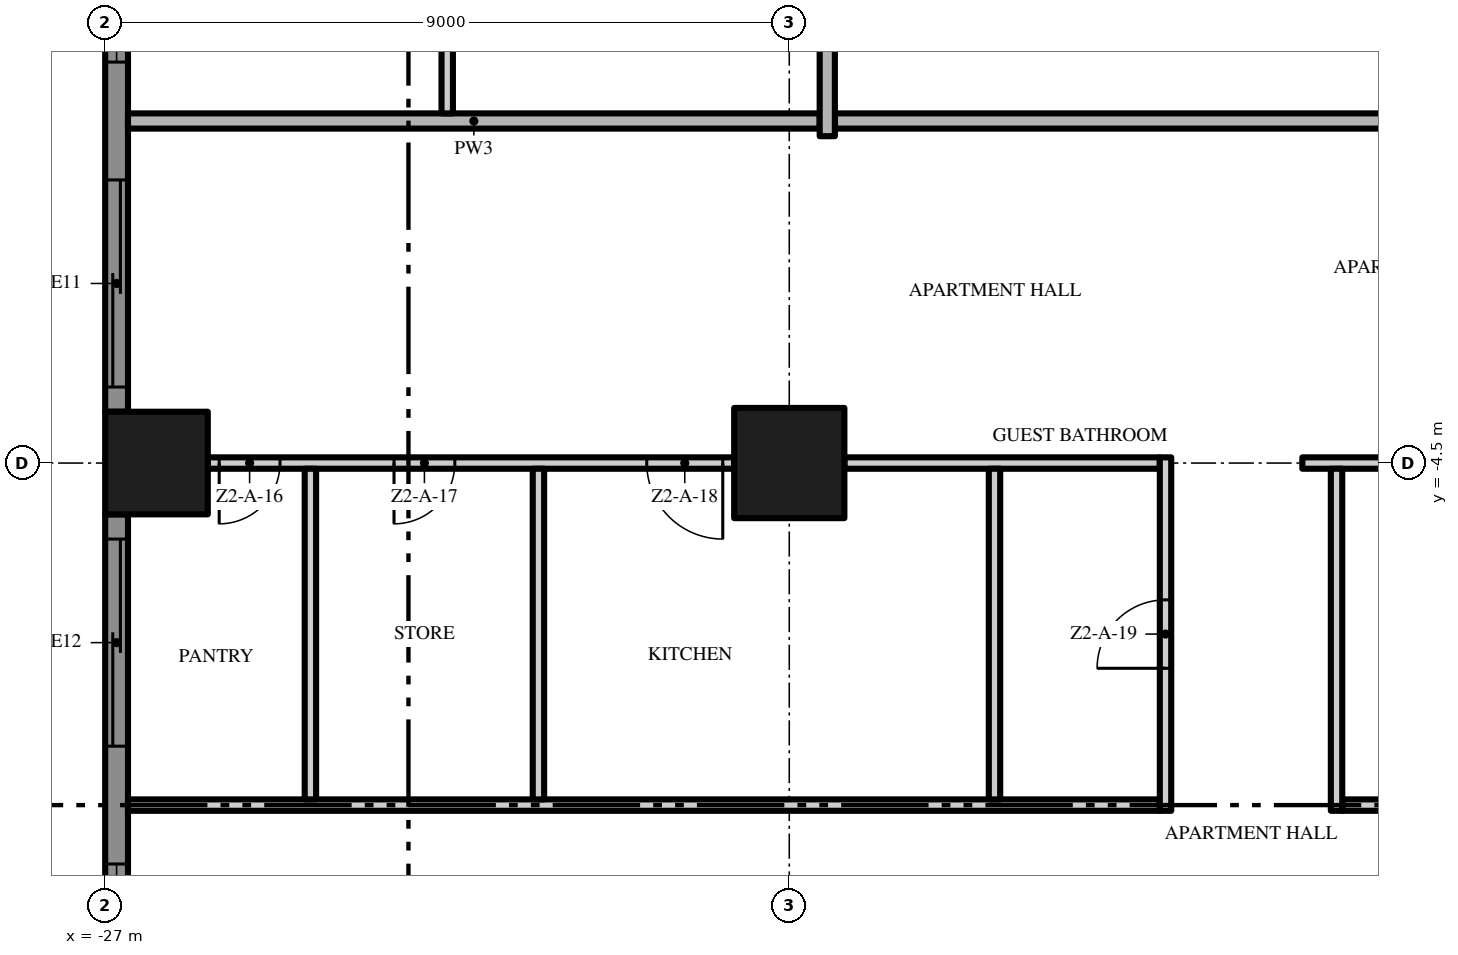
"""IFC4 building model, lengths in metres.
Left out: names, types, materials, properties, quantities, classifications, styles, units other than length and angle.
Written with IfcOpenShell. Run it as: python <this file> out.ifc"""

import sys

from ifc_helpers import new_model, si_unit, direction, frame, frame_2d, origin, origin_2d, place, context, subcontext, project, spatial, polyline, rectangle, outline, extrude, element, fill, save


model = new_model("IFC4")
c1 = context("Model", 3, precision=1e-05, world=origin(), true_north=direction((0.0, 1.0)))
c2 = subcontext(c1, "Body", "Model", "MODEL_VIEW")
j1 = project(units=[si_unit("LENGTHUNIT", "METRE"), si_unit("PLANEANGLEUNIT", "RADIAN")], contexts=[c1])
p1 = place(None, origin())
s1 = spatial("IfcSite", under=j1, at=p1, CompositionType="ELEMENT")
p2 = place(p1, origin())
s2 = spatial("IfcBuilding", under=s1, at=p2, CompositionType="ELEMENT")
p3 = place(p2, frame((0.0, 0.0, 69.4)))
s3 = spatial("IfcBuildingStorey", under=s2, at=p3, CompositionType="ELEMENT", Elevation=69.4)
p4 = place(p3, frame((-18.0, -4.5, 0.0), z_axis=(0.0, 0.0, 1.0), x_axis=(1.0, 0.0, 0.0)))
e1 = element("IfcColumn", 1, at=p4, inside=s3, PredefinedType="COLUMN", context=c2, shape_type="SweptSolid", body=[
    extrude(rectangle(XDim=1.45, YDim=1.45, at=origin_2d()), origin(), (0.0, 0.0, 1.0), 3.5),
])
p5 = place(p3, frame((-26.325, -4.5, 0.0), z_axis=(0.0, 0.0, 1.0), x_axis=(1.0, 0.0, 0.0)))
e2 = element("IfcColumn", 2, at=p5, inside=s3, PredefinedType="COLUMN", context=c2, shape_type="SweptSolid", body=[
    extrude(rectangle(XDim=1.35, YDim=1.35, at=origin_2d()), origin(), (0.0, 0.0, 1.0), 3.5),
])
p6 = place(p3, frame((-26.85, -3.825, 0.0), z_axis=(0.0, 0.0, 1.0), x_axis=(0.0, 1.0, 0.0)))
e3 = element("IfcWall", 3, at=p6, inside=s3, PredefinedType="SOLIDWALL", context=c2, shape_type="SweptSolid", body=[
    extrude(rectangle(XDim=7.65, YDim=0.3, at=frame_2d((3.825, 0.0))), origin(), (0.0, 0.0, 1.0), 3.5),
])
p7 = place(p6, frame((4.6, 0.0, 0.45)))
e4 = element("IfcOpeningElement", 4, at=p7, cuts=e3, PredefinedType="OPENING", context=c2, shape_type="SweptSolid", body=[
    extrude(rectangle(XDim=2.725, YDim=2.65, at=frame_2d((1.363, 1.325))), frame((0.0, 0.16, 0.0), z_axis=(0.0, -1.0, 0.0), x_axis=(1.0, 0.0, 0.0)), (0.0, 0.0, 1.0), 0.32),
])
p8 = place(p6, frame((0.325, 0.0, 0.0)))
e5 = element("IfcOpeningElement", 5, at=p8, cuts=e3, PredefinedType="OPENING", context=c2, shape_type="SweptSolid", body=[
    extrude(rectangle(XDim=2.725, YDim=2.4, at=frame_2d((1.363, 1.2))), frame((0.0, 0.16, 0.0), z_axis=(0.0, -1.0, 0.0), x_axis=(1.0, 0.0, 0.0)), (0.0, 0.0, 1.0), 0.32),
])
p9 = place(p3, frame((-26.85, -12.825, 0.0), z_axis=(0.0, 0.0, 1.0), x_axis=(0.0, 1.0, 0.0)))
e6 = element("IfcWall", 6, at=p9, inside=s3, PredefinedType="SOLIDWALL", context=c2, shape_type="SweptSolid", body=[
    extrude(rectangle(XDim=7.65, YDim=0.3, at=frame_2d((3.825, 0.0))), origin(), (0.0, 0.0, 1.0), 3.5),
])
p10 = place(p9, frame((4.6, 0.0, 0.0)))
e7 = element("IfcOpeningElement", 7, at=p10, cuts=e6, PredefinedType="OPENING", context=c2, shape_type="SweptSolid", body=[
    extrude(rectangle(XDim=2.725, YDim=2.4, at=frame_2d((1.363, 1.2))), frame((0.0, 0.16, 0.0), z_axis=(0.0, -1.0, 0.0), x_axis=(1.0, 0.0, 0.0)), (0.0, 0.0, 1.0), 0.32),
])
p11 = place(p9, frame((0.325, 0.0, 0.45)))
e8 = element("IfcOpeningElement", 8, at=p11, cuts=e6, PredefinedType="OPENING", context=c2, shape_type="SweptSolid", body=[
    extrude(rectangle(XDim=2.725, YDim=2.65, at=frame_2d((1.363, 1.325))), frame((0.0, 0.16, 0.0), z_axis=(0.0, -1.0, 0.0), x_axis=(1.0, 0.0, 0.0)), (0.0, 0.0, 1.0), 0.32),
])
p12 = place(p3, origin())
e9 = element("IfcWall", 9, at=p12, inside=s3, PredefinedType="USERDEFINED", context=c2, shape_type="SweptSolid", body=[
    extrude(outline(polyline([(-27.6, 18.0), (-27.829, 16.5), (-28.429, 15.0), (-29.171, 13.5), (-29.771, 12.0), (-30.0, 10.5), (-29.771, 9.0), (-29.171, 7.5), (-28.429, 6.0), (-27.829, 4.5), (-27.6, 3.0), (-27.829, 1.5), (-28.429, 0.0), (-29.171, -1.5), (-29.771, -3.0), (-30.0, -4.5), (-29.771, -6.0), (-29.171, -7.5), (-28.429, -9.0), (-27.829, -10.5), (-27.6, -12.0), (-27.829, -13.5), (-28.429, -15.0), (-29.171, -16.5), (-29.771, -18.0), (-29.539, -18.093), (-28.942, -16.602), (-28.201, -15.102), (-27.586, -13.566), (-27.347, -12.0), (-27.586, -10.434), (-28.201, -8.898), (-28.942, -7.398), (-29.528, -5.934), (-29.747, -4.5), (-29.528, -3.066), (-28.942, -1.602), (-28.201, -0.102), (-27.586, 1.434), (-27.347, 3.0), (-27.586, 4.566), (-28.201, 6.102), (-28.942, 7.602), (-29.528, 9.066), (-29.747, 10.5), (-29.528, 11.934), (-28.942, 13.398), (-28.201, 14.898), (-27.586, 16.434), (-27.353, 17.962), (-27.6, 18.0)])), origin(), (0.0, 0.0, 1.0), 0.9),
])
p13 = place(p3, frame((-26.7, -9.0, 0.0), z_axis=(0.0, 0.0, 1.0), x_axis=(1.0, 0.0, 0.0)))
e10 = element("IfcWall", 10, at=p13, inside=s3, PredefinedType="PARTITIONING", context=c2, shape_type="SweptSolid", body=[
    extrude(rectangle(XDim=13.575, YDim=0.15, at=frame_2d((6.787, 0.0))), origin(), (0.0, 0.0, 1.0), 3.5),
])
p14 = place(p3, frame((-10.725, -9.0, 0.0), z_axis=(0.0, 0.0, 1.0), x_axis=(1.0, 0.0, 0.0)))
e11 = element("IfcWall", 11, at=p14, inside=s3, PredefinedType="PARTITIONING", context=c2, shape_type="SweptSolid", body=[
    extrude(rectangle(XDim=10.625, YDim=0.15, at=frame_2d((5.312, 0.0))), origin(), (0.0, 0.0, 1.0), 3.5),
])
p15 = place(p14, frame((2.1, 0.0, 0.0)))
e12 = element("IfcOpeningElement", 12, at=p15, cuts=e11, PredefinedType="OPENING", context=c2, shape_type="SweptSolid", body=[
    extrude(rectangle(XDim=0.9, YDim=2.1, at=frame_2d((0.45, 1.05))), frame((0.0, 0.085, 0.0), z_axis=(0.0, -1.0, 0.0), x_axis=(1.0, 0.0, 0.0)), (0.0, 0.0, 1.0), 0.17),
])
p16 = place(p14, frame((9.425, 0.0, 0.0)))
e13 = element("IfcOpeningElement", 13, at=p16, cuts=e11, PredefinedType="OPENING", context=c2, shape_type="SweptSolid", body=[
    extrude(rectangle(XDim=0.8, YDim=2.0, at=frame_2d((0.4, 1.0))), frame((0.0, 0.085, 0.0), z_axis=(0.0, -1.0, 0.0), x_axis=(1.0, 0.0, 0.0)), (0.0, 0.0, 1.0), 0.17),
])
p17 = place(p3, frame((-18.725, -4.5, 0.0), z_axis=(0.0, 0.0, 1.0), x_axis=(-1.0, 0.0, 0.0)))
e14 = element("IfcWall", 14, at=p17, inside=s3, PredefinedType="PARTITIONING", context=c2, shape_type="SweptSolid", body=[
    extrude(rectangle(XDim=6.925, YDim=0.15, at=frame_2d((3.462, 0.0))), origin(), (0.0, 0.0, 1.0), 3.5),
])
p18 = place(p17, frame((5.975, 0.0, 0.0)))
e15 = element("IfcOpeningElement", 15, at=p18, cuts=e14, PredefinedType="OPENING", context=c2, shape_type="SweptSolid", body=[
    extrude(rectangle(XDim=0.8, YDim=2.0, at=frame_2d((0.4, 1.0))), frame((0.0, 0.085, 0.0), z_axis=(0.0, -1.0, 0.0), x_axis=(1.0, 0.0, 0.0)), (0.0, 0.0, 1.0), 0.17),
])
p19 = place(p17, frame((3.675, 0.0, 0.0)))
e16 = element("IfcOpeningElement", 16, at=p19, cuts=e14, PredefinedType="OPENING", context=c2, shape_type="SweptSolid", body=[
    extrude(rectangle(XDim=0.8, YDim=2.0, at=frame_2d((0.4, 1.0))), frame((0.0, 0.085, 0.0), z_axis=(0.0, -1.0, 0.0), x_axis=(1.0, 0.0, 0.0)), (0.0, 0.0, 1.0), 0.17),
])
p20 = place(p17, frame((0.15, 0.0, 0.0)))
e17 = element("IfcOpeningElement", 17, at=p20, cuts=e14, PredefinedType="OPENING", context=c2, shape_type="SweptSolid", body=[
    extrude(rectangle(XDim=1.0, YDim=2.4, at=frame_2d((0.5, 1.2))), frame((0.0, 0.085, 0.0), z_axis=(0.0, -1.0, 0.0), x_axis=(1.0, 0.0, 0.0)), (0.0, 0.0, 1.0), 0.17),
])
p21 = place(p3, frame((-17.275, -4.5, 0.0), z_axis=(0.0, 0.0, 1.0), x_axis=(1.0, 0.0, 0.0)))
e18 = element("IfcWall", 18, at=p21, inside=s3, PredefinedType="PARTITIONING", context=c2, shape_type="SweptSolid", body=[
    extrude(rectangle(XDim=4.15, YDim=0.15, at=frame_2d((2.075, 0.0))), origin(), (0.0, 0.0, 1.0), 3.5),
])
p22 = place(p3, frame((-11.25, -4.5, 0.0), z_axis=(0.0, 0.0, 1.0), x_axis=(1.0, 0.0, 0.0)))
e19 = element("IfcWall", 19, at=p22, inside=s3, PredefinedType="PARTITIONING", context=c2, shape_type="SweptSolid", body=[
    extrude(rectangle(XDim=1.525, YDim=0.15, at=frame_2d((0.762, 0.0))), origin(), (0.0, 0.0, 1.0), 3.5),
])
p23 = place(p3, frame((-0.1, 0.0, 0.0), z_axis=(0.0, 0.0, 1.0), x_axis=(-1.0, 0.0, 0.0)))
e20 = element("IfcWall", 20, at=p23, inside=s3, PredefinedType="PARTITIONING", context=c2, shape_type="SweptSolid", body=[
    extrude(rectangle(XDim=17.3, YDim=0.2, at=frame_2d((8.65, 0.0))), origin(), (0.0, 0.0, 1.0), 3.5),
])
p24 = place(p23, frame((8.15, 0.0, 0.0)))
e21 = element("IfcOpeningElement", 21, at=p24, cuts=e20, PredefinedType="OPENING", context=c2, shape_type="SweptSolid", body=[
    extrude(rectangle(XDim=1.5, YDim=2.4, at=frame_2d((0.75, 1.2))), frame((0.0, 0.11, 0.0), z_axis=(0.0, -1.0, 0.0), x_axis=(1.0, 0.0, 0.0)), (0.0, 0.0, 1.0), 0.22),
])
p25 = place(p3, frame((-26.7, 0.0, 0.0), z_axis=(0.0, 0.0, 1.0), x_axis=(1.0, 0.0, 0.0)))
e22 = element("IfcWall", 22, at=p25, inside=s3, PredefinedType="PARTITIONING", context=c2, shape_type="SweptSolid", body=[
    extrude(rectangle(XDim=9.1, YDim=0.2, at=frame_2d((4.55, 0.0))), origin(), (0.0, 0.0, 1.0), 3.5),
])
p26 = place(p3, frame((-24.3, -8.925, 0.0), z_axis=(0.0, 0.0, 1.0), x_axis=(0.0, 1.0, 0.0)))
e23 = element("IfcWall", 23, at=p26, inside=s3, PredefinedType="PARTITIONING", context=c2, shape_type="SweptSolid", body=[
    extrude(rectangle(XDim=4.35, YDim=0.15, at=frame_2d((2.175, 0.0))), origin(), (0.0, 0.0, 1.0), 3.5),
])
p27 = place(p3, frame((-22.5, 0.1, 0.0), z_axis=(0.0, 0.0, 1.0), x_axis=(0.0, 1.0, 0.0)))
e24 = element("IfcWall", 24, at=p27, inside=s3, PredefinedType="PARTITIONING", context=c2, shape_type="SweptSolid", body=[
    extrude(rectangle(XDim=17.225, YDim=0.15, at=frame_2d((8.613, 0.0))), origin(), (0.0, 0.0, 1.0), 3.5),
])
p28 = place(p27, frame((1.65, 0.0, 0.0)))
e25 = element("IfcOpeningElement", 25, at=p28, cuts=e24, PredefinedType="OPENING", context=c2, shape_type="SweptSolid", body=[
    extrude(rectangle(XDim=1.0, YDim=2.4, at=frame_2d((0.5, 1.2))), frame((0.0, 0.085, 0.0), z_axis=(0.0, -1.0, 0.0), x_axis=(1.0, 0.0, 0.0)), (0.0, 0.0, 1.0), 0.17),
])
p29 = place(p27, frame((7.25, 0.0, 0.0)))
e26 = element("IfcOpeningElement", 26, at=p29, cuts=e24, PredefinedType="OPENING", context=c2, shape_type="SweptSolid", body=[
    extrude(rectangle(XDim=1.0, YDim=2.4, at=frame_2d((0.5, 1.2))), frame((0.0, 0.085, 0.0), z_axis=(0.0, -1.0, 0.0), x_axis=(1.0, 0.0, 0.0)), (0.0, 0.0, 1.0), 0.17),
])
p30 = place(p27, frame((9.5, 0.0, 0.0)))
e27 = element("IfcOpeningElement", 27, at=p30, cuts=e24, PredefinedType="OPENING", context=c2, shape_type="SweptSolid", body=[
    extrude(rectangle(XDim=1.0, YDim=2.4, at=frame_2d((0.5, 1.2))), frame((0.0, 0.085, 0.0), z_axis=(0.0, -1.0, 0.0), x_axis=(1.0, 0.0, 0.0)), (0.0, 0.0, 1.0), 0.17),
])
p31 = place(p27, frame((16.075, 0.0, 0.0)))
e28 = element("IfcOpeningElement", 28, at=p31, cuts=e24, PredefinedType="OPENING", context=c2, shape_type="SweptSolid", body=[
    extrude(rectangle(XDim=1.0, YDim=2.4, at=frame_2d((0.5, 1.2))), frame((0.0, 0.085, 0.0), z_axis=(0.0, -1.0, 0.0), x_axis=(1.0, 0.0, 0.0)), (0.0, 0.0, 1.0), 0.17),
])
p32 = place(p3, frame((-21.3, -8.925, 0.0), z_axis=(0.0, 0.0, 1.0), x_axis=(0.0, 1.0, 0.0)))
e29 = element("IfcWall", 29, at=p32, inside=s3, PredefinedType="PARTITIONING", context=c2, shape_type="SweptSolid", body=[
    extrude(rectangle(XDim=4.35, YDim=0.15, at=frame_2d((2.175, 0.0))), origin(), (0.0, 0.0, 1.0), 3.5),
])
p33 = place(p3, frame((-17.5, -0.2, 0.0), z_axis=(0.0, 0.0, 1.0), x_axis=(0.0, 1.0, 0.0)))
e30 = element("IfcWall", 30, at=p33, inside=s3, PredefinedType="PARTITIONING", context=c2, shape_type="SweptSolid", body=[
    extrude(rectangle(XDim=3.975, YDim=0.2, at=frame_2d((1.988, 0.0))), origin(), (0.0, 0.0, 1.0), 3.5),
])
p34 = place(p3, frame((-15.3, -8.925, 0.0), z_axis=(0.0, 0.0, 1.0), x_axis=(0.0, 1.0, 0.0)))
e31 = element("IfcWall", 31, at=p34, inside=s3, PredefinedType="PARTITIONING", context=c2, shape_type="SweptSolid", body=[
    extrude(rectangle(XDim=4.35, YDim=0.15, at=frame_2d((2.175, 0.0))), origin(), (0.0, 0.0, 1.0), 3.5),
])
p35 = place(p3, frame((-13.05, -9.075, 0.0), z_axis=(0.0, 0.0, 1.0), x_axis=(0.0, 1.0, 0.0)))
e32 = element("IfcWall", 32, at=p35, inside=s3, PredefinedType="PARTITIONING", context=c2, shape_type="SweptSolid", body=[
    extrude(rectangle(XDim=4.65, YDim=0.15, at=frame_2d((2.325, 0.0))), origin(), (0.0, 0.0, 1.0), 3.5),
])
p36 = place(p35, frame((1.875, 0.0, 0.0)))
e33 = element("IfcOpeningElement", 33, at=p36, cuts=e32, PredefinedType="OPENING", context=c2, shape_type="SweptSolid", body=[
    extrude(rectangle(XDim=0.9, YDim=2.1, at=frame_2d((0.45, 1.05))), frame((0.0, 0.085, 0.0), z_axis=(0.0, -1.0, 0.0), x_axis=(1.0, 0.0, 0.0)), (0.0, 0.0, 1.0), 0.17),
])
p37 = place(p3, frame((-10.8, -9.075, 0.0), z_axis=(0.0, 0.0, 1.0), x_axis=(0.0, 1.0, 0.0)))
e34 = element("IfcWall", 34, at=p37, inside=s3, PredefinedType="PARTITIONING", context=c2, shape_type="SweptSolid", body=[
    extrude(rectangle(XDim=4.5, YDim=0.15, at=frame_2d((2.25, 0.0))), origin(), (0.0, 0.0, 1.0), 3.5),
])
p38 = place(p7, origin())
e35 = element("IfcWindow", 35, at=p38, inside=s3, PartitioningType="SINGLE_PANEL", PredefinedType="WINDOW", context=c2, shape_type="SweptSolid", body=[
    extrude(rectangle(XDim=2.725, YDim=2.65, at=frame_2d((1.363, 1.325))), frame((0.0, 0.03, 0.0), z_axis=(0.0, -1.0, 0.0), x_axis=(1.0, 0.0, 0.0)), (0.0, 0.0, 1.0), 0.06),
])
fill(e4, e35)
p39 = place(p8, origin())
e36 = element("IfcDoor", 36, at=p39, inside=s3, OperationType="SINGLE_SWING_LEFT", PredefinedType="DOOR", context=c2, shape_type="SweptSolid", body=[
    extrude(rectangle(XDim=2.725, YDim=2.4, at=frame_2d((1.363, 1.2))), frame((0.0, 0.025, 0.0), z_axis=(0.0, -1.0, 0.0), x_axis=(1.0, 0.0, 0.0)), (0.0, 0.0, 1.0), 0.05),
])
fill(e5, e36)
p40 = place(p10, origin())
e37 = element("IfcDoor", 37, at=p40, inside=s3, OperationType="SINGLE_SWING_LEFT", PredefinedType="DOOR", context=c2, shape_type="SweptSolid", body=[
    extrude(rectangle(XDim=2.725, YDim=2.4, at=frame_2d((1.363, 1.2))), frame((0.0, 0.025, 0.0), z_axis=(0.0, -1.0, 0.0), x_axis=(1.0, 0.0, 0.0)), (0.0, 0.0, 1.0), 0.05),
])
fill(e7, e37)
p41 = place(p11, origin())
e38 = element("IfcWindow", 38, at=p41, inside=s3, PartitioningType="SINGLE_PANEL", PredefinedType="WINDOW", context=c2, shape_type="SweptSolid", body=[
    extrude(rectangle(XDim=2.725, YDim=2.65, at=frame_2d((1.363, 1.325))), frame((0.0, 0.03, 0.0), z_axis=(0.0, -1.0, 0.0), x_axis=(1.0, 0.0, 0.0)), (0.0, 0.0, 1.0), 0.06),
])
fill(e8, e38)
p42 = place(p18, origin())
e39 = element("IfcDoor", 39, at=p42, inside=s3, OperationType="SINGLE_SWING_RIGHT", PredefinedType="DOOR", context=c2, shape_type="SweptSolid", body=[
    extrude(rectangle(XDim=0.8, YDim=2.0, at=frame_2d((0.4, 1.0))), frame((0.0, 0.025, 0.0), z_axis=(0.0, -1.0, 0.0), x_axis=(1.0, 0.0, 0.0)), (0.0, 0.0, 1.0), 0.05),
])
fill(e15, e39)
p43 = place(p19, origin())
e40 = element("IfcDoor", 40, at=p43, inside=s3, OperationType="SINGLE_SWING_RIGHT", PredefinedType="DOOR", context=c2, shape_type="SweptSolid", body=[
    extrude(rectangle(XDim=0.8, YDim=2.0, at=frame_2d((0.4, 1.0))), frame((0.0, 0.025, 0.0), z_axis=(0.0, -1.0, 0.0), x_axis=(1.0, 0.0, 0.0)), (0.0, 0.0, 1.0), 0.05),
])
fill(e16, e40)
p44 = place(p20, origin())
e41 = element("IfcDoor", 41, at=p44, inside=s3, OperationType="SINGLE_SWING_LEFT", PredefinedType="DOOR", context=c2, shape_type="SweptSolid", body=[
    extrude(rectangle(XDim=1.0, YDim=2.4, at=frame_2d((0.5, 1.2))), frame((0.0, 0.025, 0.0), z_axis=(0.0, -1.0, 0.0), x_axis=(1.0, 0.0, 0.0)), (0.0, 0.0, 1.0), 0.05),
])
fill(e17, e41)
p45 = place(p36, origin())
e42 = element("IfcDoor", 42, at=p45, inside=s3, OperationType="SINGLE_SWING_LEFT", PredefinedType="DOOR", context=c2, shape_type="SweptSolid", body=[
    extrude(rectangle(XDim=0.9, YDim=2.1, at=frame_2d((0.45, 1.05))), frame((0.0, 0.025, 0.0), z_axis=(0.0, -1.0, 0.0), x_axis=(1.0, 0.0, 0.0)), (0.0, 0.0, 1.0), 0.05),
])
fill(e33, e42)
save(model, sys.argv[1])
